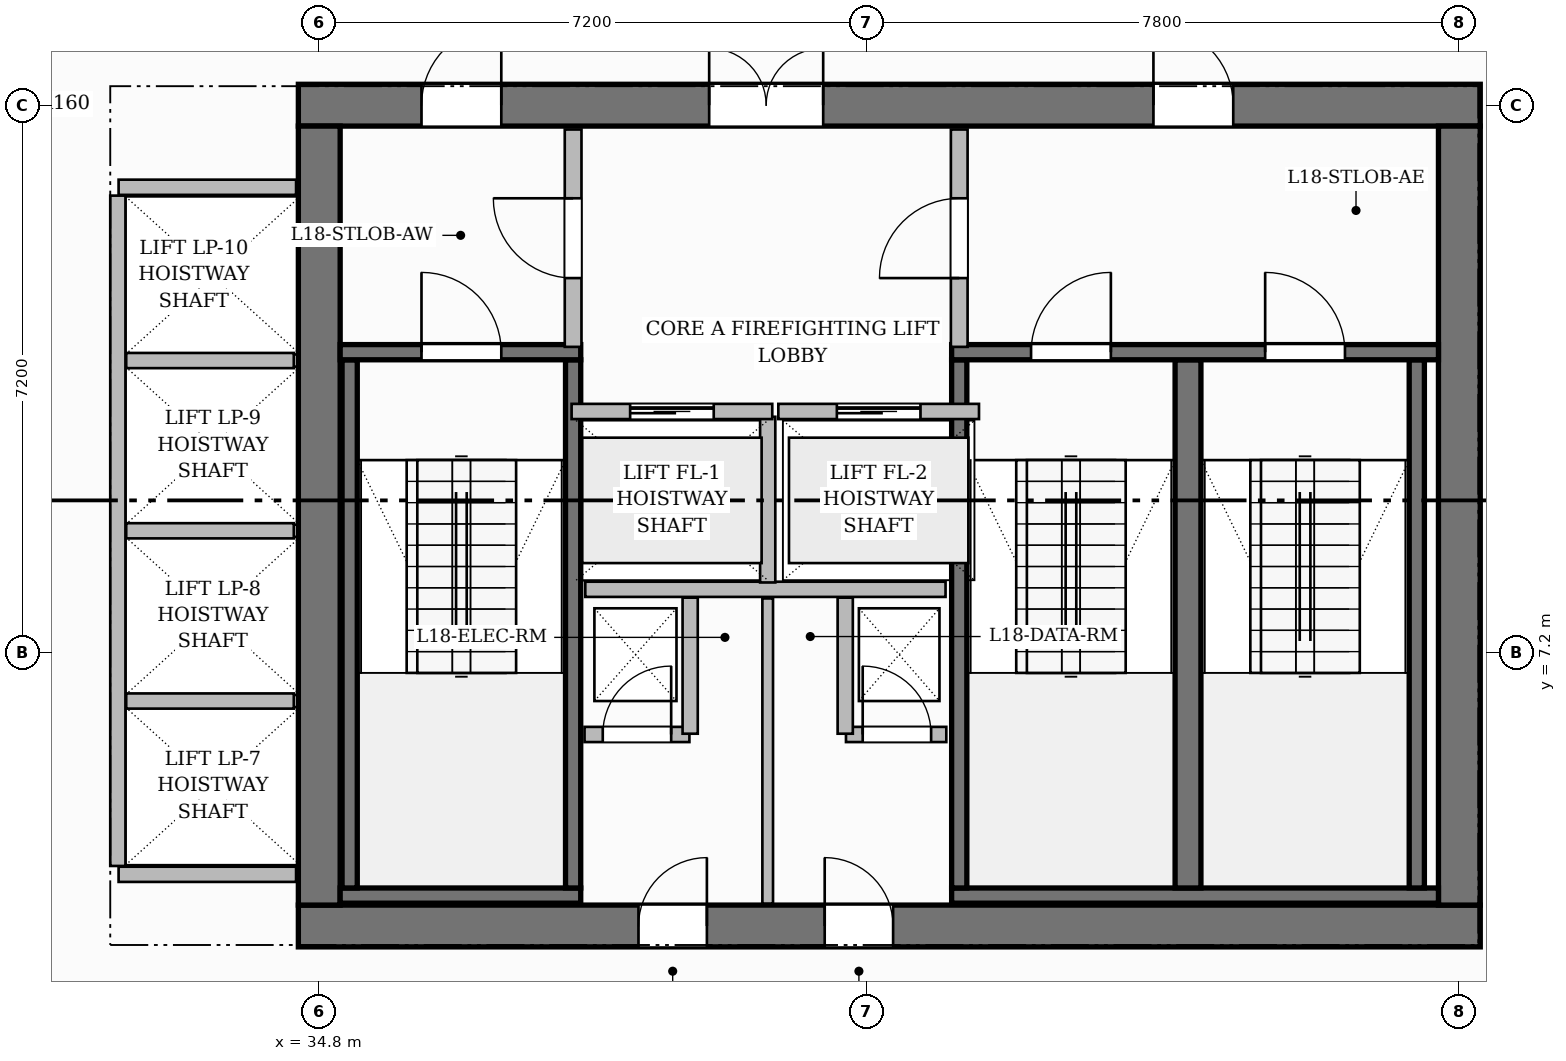
"""IFC4 building model, lengths in metres.
Left out: names, types, materials, properties, quantities, classifications, styles, units other than length and angle.
Written with IfcOpenShell. Run it as: python <this file> out.ifc"""

import sys

from ifc_helpers import new_model, si_unit, direction, frame, frame_2d, origin, place, context, subcontext, project, spatial, rectangle, extrude, source, transform, mapped, element, fill, save


model = new_model("IFC4")
c1 = context("Model", 3, precision=1e-05, world=origin(), true_north=direction((0.0, 1.0)))
c2 = subcontext(c1, "Body", "Model", "MODEL_VIEW")
j1 = project(units=[si_unit("LENGTHUNIT", "METRE"), si_unit("PLANEANGLEUNIT", "RADIAN")], contexts=[c1])
p1 = place(None, origin())
s1 = spatial("IfcSite", under=j1, at=p1, CompositionType="ELEMENT")
p2 = place(p1, origin())
s2 = spatial("IfcBuilding", under=s1, at=p2, CompositionType="ELEMENT")
p3 = place(p2, frame((0.0, 0.0, 76.8)))
s3 = spatial("IfcBuildingStorey", under=s2, at=p3, CompositionType="ELEMENT", Elevation=76.8)
p4 = place(p3, frame((34.525, 3.6, 0.0), z_axis=(0.0, 0.0, 1.0), x_axis=(1.0, 0.0, 0.0)))
e1 = element("IfcWall", 1, at=p4, inside=s3, PredefinedType="SHEAR", context=c2, shape_type="SweptSolid", body=[
    extrude(rectangle(XDim=15.55, YDim=0.55, at=frame_2d((7.775, 0.0))), origin(), (0.0, 0.0, 1.0), 3.7),
])
p5 = place(p4, frame((4.475, 0.0, 0.0)))
e2 = element("IfcOpeningElement", 2, at=p5, cuts=e1, PredefinedType="OPENING", context=c2, shape_type="SweptSolid", body=[
    extrude(rectangle(XDim=0.9, YDim=2.1, at=frame_2d((0.45, 1.05))), frame((0.0, 0.285, 0.0), z_axis=(0.0, -1.0, 0.0), x_axis=(1.0, 0.0, 0.0)), (0.0, 0.0, 1.0), 0.57),
])
p6 = place(p4, frame((6.925, 0.0, 0.0)))
e3 = element("IfcOpeningElement", 3, at=p6, cuts=e1, PredefinedType="OPENING", context=c2, shape_type="SweptSolid", body=[
    extrude(rectangle(XDim=0.9, YDim=2.1, at=frame_2d((0.45, 1.05))), frame((0.0, 0.285, 0.0), z_axis=(0.0, -1.0, 0.0), x_axis=(1.0, 0.0, 0.0)), (0.0, 0.0, 1.0), 0.57),
])
p7 = place(p3, frame((34.525, 14.4, 0.0), z_axis=(0.0, 0.0, 1.0), x_axis=(1.0, 0.0, 0.0)))
e4 = element("IfcWall", 4, at=p7, inside=s3, PredefinedType="SHEAR", context=c2, shape_type="SweptSolid", body=[
    extrude(rectangle(XDim=15.55, YDim=0.55, at=frame_2d((7.775, 0.0))), origin(), (0.0, 0.0, 1.0), 3.7),
])
p8 = place(p7, frame((5.405, 0.0, 0.0)))
e5 = element("IfcOpeningElement", 5, at=p8, cuts=e4, PredefinedType="OPENING", context=c2, shape_type="SweptSolid", body=[
    extrude(rectangle(XDim=1.5, YDim=2.2, at=frame_2d((0.75, 1.1))), frame((0.0, 0.285, 0.0), z_axis=(0.0, -1.0, 0.0), x_axis=(1.0, 0.0, 0.0)), (0.0, 0.0, 1.0), 0.57),
])
p9 = place(p7, frame((1.62, 0.0, 0.0)))
e6 = element("IfcOpeningElement", 6, at=p9, cuts=e4, PredefinedType="OPENING", context=c2, shape_type="SweptSolid", body=[
    extrude(rectangle(XDim=1.05, YDim=2.15, at=frame_2d((0.525, 1.075))), frame((0.0, 0.285, 0.0), z_axis=(0.0, -1.0, 0.0), x_axis=(1.0, 0.0, 0.0)), (0.0, 0.0, 1.0), 0.57),
])
p10 = place(p7, frame((11.25, 0.0, 0.0)))
e7 = element("IfcOpeningElement", 7, at=p10, cuts=e4, PredefinedType="OPENING", context=c2, shape_type="SweptSolid", body=[
    extrude(rectangle(XDim=1.05, YDim=2.15, at=frame_2d((0.525, 1.075))), frame((0.0, 0.285, 0.0), z_axis=(0.0, -1.0, 0.0), x_axis=(1.0, 0.0, 0.0)), (0.0, 0.0, 1.0), 0.57),
])
for number, where, z_axis, x_axis in (
    (8, (34.8, 3.875, 0.0), (0.0, 0.0, 1.0), (0.0, 1.0, 0.0)),
    (9, (49.8, 3.875, 0.0), (0.0, 0.0, 1.0), (0.0, 1.0, 0.0)),
):
    element("IfcWall", number, at=place(p3, frame(where, z_axis=z_axis, x_axis=x_axis)), inside=s3, PredefinedType="SHEAR", context=c2, shape_type="SweptSolid", body=[
        extrude(rectangle(XDim=10.25, YDim=0.55, at=frame_2d((5.125, 0.0))), origin(), (0.0, 0.0, 1.0), 3.7),
    ])
p11 = place(p3, frame((35.075, 4.0, 0.0), z_axis=(0.0, 0.0, 1.0), x_axis=(1.0, 0.0, 0.0)))
e10 = element("IfcWall", 10, at=p11, inside=s3, PredefinedType="SHEAR", context=c2, shape_type="SweptSolid", body=[
    extrude(rectangle(XDim=3.165, YDim=0.2, at=frame_2d((1.583, 0.0))), origin(), (0.0, 0.0, 1.0), 3.7),
])
for number, where, z_axis, x_axis in (
    (11, (35.2, 4.1, 0.0), (0.0, 0.0, 1.0), (0.0, 1.0, 0.0)),
    (12, (38.14, 4.1, 0.0), (0.0, 0.0, 1.0), (0.0, 1.0, 0.0)),
):
    element("IfcWall", number, at=place(p3, frame(where, z_axis=z_axis, x_axis=x_axis)), inside=s3, PredefinedType="SHEAR", context=c2, shape_type="SweptSolid", body=[
        extrude(rectangle(XDim=6.95, YDim=0.2, at=frame_2d((3.475, 0.0))), origin(), (0.0, 0.0, 1.0), 3.7),
    ])
p12 = place(p3, frame((35.075, 11.15, 0.0), z_axis=(0.0, 0.0, 1.0), x_axis=(1.0, 0.0, 0.0)))
e13 = element("IfcWall", 13, at=p12, inside=s3, PredefinedType="SHEAR", context=c2, shape_type="SweptSolid", body=[
    extrude(rectangle(XDim=3.165, YDim=0.2, at=frame_2d((1.583, 0.0))), origin(), (0.0, 0.0, 1.0), 3.7),
])
p13 = place(p12, frame((1.07, 0.0, 0.0)))
e14 = element("IfcOpeningElement", 14, at=p13, cuts=e13, PredefinedType="OPENING", context=c2, shape_type="SweptSolid", body=[
    extrude(rectangle(XDim=1.05, YDim=2.2, at=frame_2d((0.525, 1.1))), frame((0.0, 0.11, 0.0), z_axis=(0.0, -1.0, 0.0), x_axis=(1.0, 0.0, 0.0)), (0.0, 0.0, 1.0), 0.22),
])
p14 = place(p3, frame((43.12, 4.0, 0.0), z_axis=(0.0, 0.0, 1.0), x_axis=(1.0, 0.0, 0.0)))
e15 = element("IfcWall", 15, at=p14, inside=s3, PredefinedType="SHEAR", context=c2, shape_type="SweptSolid", body=[
    extrude(rectangle(XDim=6.405, YDim=0.2, at=frame_2d((3.202, 0.0))), origin(), (0.0, 0.0, 1.0), 3.7),
])
p15 = place(p3, frame((43.22, 4.1, 0.0), z_axis=(0.0, 0.0, 1.0), x_axis=(0.0, 1.0, 0.0)))
e16 = element("IfcWall", 16, at=p15, inside=s3, PredefinedType="SHEAR", context=c2, shape_type="SweptSolid", body=[
    extrude(rectangle(XDim=6.95, YDim=0.2, at=frame_2d((3.475, 0.0))), origin(), (0.0, 0.0, 1.0), 3.7),
])
p16 = place(p3, frame((46.23, 4.1, 0.0), z_axis=(0.0, 0.0, 1.0), x_axis=(0.0, 1.0, 0.0)))
e17 = element("IfcWall", 17, at=p16, inside=s3, PredefinedType="SHEAR", context=c2, shape_type="SweptSolid", body=[
    extrude(rectangle(XDim=6.95, YDim=0.34, at=frame_2d((3.475, 0.0))), origin(), (0.0, 0.0, 1.0), 3.7),
])
p17 = place(p3, frame((49.24, 4.1, 0.0), z_axis=(0.0, 0.0, 1.0), x_axis=(0.0, 1.0, 0.0)))
e18 = element("IfcWall", 18, at=p17, inside=s3, PredefinedType="SHEAR", context=c2, shape_type="SweptSolid", body=[
    extrude(rectangle(XDim=6.95, YDim=0.2, at=frame_2d((3.475, 0.0))), origin(), (0.0, 0.0, 1.0), 3.7),
])
p18 = place(p3, frame((43.12, 11.15, 0.0), z_axis=(0.0, 0.0, 1.0), x_axis=(1.0, 0.0, 0.0)))
e19 = element("IfcWall", 19, at=p18, inside=s3, PredefinedType="SHEAR", context=c2, shape_type="SweptSolid", body=[
    extrude(rectangle(XDim=6.405, YDim=0.2, at=frame_2d((3.202, 0.0))), origin(), (0.0, 0.0, 1.0), 3.7),
])
p19 = place(p18, frame((1.045, 0.0, 0.0)))
e20 = element("IfcOpeningElement", 20, at=p19, cuts=e19, PredefinedType="OPENING", context=c2, shape_type="SweptSolid", body=[
    extrude(rectangle(XDim=1.05, YDim=2.2, at=frame_2d((0.525, 1.1))), frame((0.0, 0.11, 0.0), z_axis=(0.0, -1.0, 0.0), x_axis=(1.0, 0.0, 0.0)), (0.0, 0.0, 1.0), 0.22),
])
p20 = place(p18, frame((4.125, 0.0, 0.0)))
e21 = element("IfcOpeningElement", 21, at=p20, cuts=e19, PredefinedType="OPENING", context=c2, shape_type="SweptSolid", body=[
    extrude(rectangle(XDim=1.05, YDim=2.2, at=frame_2d((0.525, 1.1))), frame((0.0, 0.11, 0.0), z_axis=(0.0, -1.0, 0.0), x_axis=(1.0, 0.0, 0.0)), (0.0, 0.0, 1.0), 0.22),
])
p21 = place(p3, frame((38.3, 8.03, 0.0), z_axis=(0.0, 0.0, 1.0), x_axis=(1.0, 0.0, 0.0)))
e22 = element("IfcWall", 22, at=p21, inside=s3, PredefinedType="PARTITIONING", context=c2, shape_type="SweptSolid", body=[
    extrude(rectangle(XDim=4.74, YDim=0.2, at=frame_2d((2.37, 0.0))), origin(), (0.0, 0.0, 1.0), 3.45),
])
p22 = place(p3, frame((40.7, 8.12, 0.0), z_axis=(0.0, 0.0, 1.0), x_axis=(0.0, 1.0, 0.0)))
e23 = element("IfcWall", 23, at=p22, inside=s3, PredefinedType="PARTITIONING", context=c2, shape_type="SweptSolid", body=[
    extrude(rectangle(XDim=2.18, YDim=0.2, at=frame_2d((1.09, 0.0))), origin(), (0.0, 0.0, 1.0), 3.45),
])
p23 = place(p3, frame((38.14, 11.22, 0.0), z_axis=(0.0, 0.0, 1.0), x_axis=(0.0, 1.0, 0.0)))
e24 = element("IfcWall", 24, at=p23, inside=s3, PredefinedType="PARTITIONING", context=c2, shape_type="SweptSolid", body=[
    extrude(rectangle(XDim=2.86, YDim=0.22, at=frame_2d((1.43, 0.0))), origin(), (0.0, 0.0, 1.0), 3.45),
])
p24 = place(p23, frame((0.905, 0.0, 0.0)))
e25 = element("IfcOpeningElement", 25, at=p24, cuts=e24, PredefinedType="OPENING", context=c2, shape_type="SweptSolid", body=[
    extrude(rectangle(XDim=1.05, YDim=2.15, at=frame_2d((0.525, 1.075))), frame((0.0, 0.12, 0.0), z_axis=(0.0, -1.0, 0.0), x_axis=(1.0, 0.0, 0.0)), (0.0, 0.0, 1.0), 0.24),
])
p25 = place(p3, frame((43.22, 11.22, 0.0), z_axis=(0.0, 0.0, 1.0), x_axis=(0.0, 1.0, 0.0)))
e26 = element("IfcWall", 26, at=p25, inside=s3, PredefinedType="PARTITIONING", context=c2, shape_type="SweptSolid", body=[
    extrude(rectangle(XDim=2.86, YDim=0.22, at=frame_2d((1.43, 0.0))), origin(), (0.0, 0.0, 1.0), 3.45),
])
p26 = place(p25, frame((0.905, 0.0, 0.0)))
e27 = element("IfcOpeningElement", 27, at=p26, cuts=e26, PredefinedType="OPENING", context=c2, shape_type="SweptSolid", body=[
    extrude(rectangle(XDim=1.05, YDim=2.15, at=frame_2d((0.525, 1.075))), frame((0.0, 0.12, 0.0), z_axis=(0.0, -1.0, 0.0), x_axis=(1.0, 0.0, 0.0)), (0.0, 0.0, 1.0), 0.24),
])
p27 = place(p3, frame((38.29, 6.12, 0.0), z_axis=(0.0, 0.0, 1.0), x_axis=(1.0, 0.0, 0.0)))
e28 = element("IfcWall", 28, at=p27, inside=s3, PredefinedType="PARTITIONING", context=c2, shape_type="SweptSolid", body=[
    extrude(rectangle(XDim=1.38, YDim=0.2, at=frame_2d((0.69, 0.0))), origin(), (0.0, 0.0, 1.0), 3.45),
])
p28 = place(p27, frame((0.24, 0.0, 0.0)))
e29 = element("IfcOpeningElement", 29, at=p28, cuts=e28, PredefinedType="OPENING", context=c2, shape_type="SweptSolid", body=[
    extrude(rectangle(XDim=0.9, YDim=2.1, at=frame_2d((0.45, 1.05))), frame((0.0, 0.11, 0.0), z_axis=(0.0, -1.0, 0.0), x_axis=(1.0, 0.0, 0.0)), (0.0, 0.0, 1.0), 0.22),
])
p29 = place(p3, frame((39.68, 6.13, 0.0), z_axis=(0.0, 0.0, 1.0), x_axis=(0.0, 1.0, 0.0)))
e30 = element("IfcWall", 30, at=p29, inside=s3, PredefinedType="PARTITIONING", context=c2, shape_type="SweptSolid", body=[
    extrude(rectangle(XDim=1.79, YDim=0.2, at=frame_2d((0.895, 0.0))), origin(), (0.0, 0.0, 1.0), 3.45),
])
p30 = place(p3, frame((41.73, 6.12, 0.0), z_axis=(0.0, 0.0, 1.0), x_axis=(1.0, 0.0, 0.0)))
e31 = element("IfcWall", 31, at=p30, inside=s3, PredefinedType="PARTITIONING", context=c2, shape_type="SweptSolid", body=[
    extrude(rectangle(XDim=1.32, YDim=0.2, at=frame_2d((0.66, 0.0))), origin(), (0.0, 0.0, 1.0), 3.45),
])
p31 = place(p30, frame((0.22, 0.0, 0.0)))
e32 = element("IfcOpeningElement", 32, at=p31, cuts=e31, PredefinedType="OPENING", context=c2, shape_type="SweptSolid", body=[
    extrude(rectangle(XDim=0.9, YDim=2.1, at=frame_2d((0.45, 1.05))), frame((0.0, 0.11, 0.0), z_axis=(0.0, -1.0, 0.0), x_axis=(1.0, 0.0, 0.0)), (0.0, 0.0, 1.0), 0.22),
])
p32 = place(p3, frame((41.72, 6.13, 0.0), z_axis=(0.0, 0.0, 1.0), x_axis=(0.0, 1.0, 0.0)))
e33 = element("IfcWall", 33, at=p32, inside=s3, PredefinedType="PARTITIONING", context=c2, shape_type="SweptSolid", body=[
    extrude(rectangle(XDim=1.79, YDim=0.2, at=frame_2d((0.895, 0.0))), origin(), (0.0, 0.0, 1.0), 3.45),
])
p33 = place(p3, frame((40.7, 3.895, 0.0), z_axis=(0.0, 0.0, 1.0), x_axis=(0.0, 1.0, 0.0)))
e34 = element("IfcWall", 34, at=p33, inside=s3, PredefinedType="PARTITIONING", context=c2, shape_type="SweptSolid", body=[
    extrude(rectangle(XDim=4.015, YDim=0.14, at=frame_2d((2.007, 0.0))), origin(), (0.0, 0.0, 1.0), 3.45),
])
for number, where, z_axis, x_axis in (
    (35, (32.16, 4.28, 0.0), (0.0, 0.0, 1.0), (1.0, 0.0, 0.0)),
    (36, (32.16, 13.32, 0.0), (0.0, 0.0, 1.0), (1.0, 0.0, 0.0)),
):
    element("IfcWall", number, at=place(p3, frame(where, z_axis=z_axis, x_axis=x_axis)), inside=s3, PredefinedType="PARTITIONING", context=c2, shape_type="SweptSolid", body=[
        extrude(rectangle(XDim=2.335, YDim=0.2, at=frame_2d((1.167, 0.0))), origin(), (0.0, 0.0, 1.0), 3.45),
    ])
p34 = place(p3, frame((32.15, 4.39, 0.0), z_axis=(0.0, 0.0, 1.0), x_axis=(0.0, 1.0, 0.0)))
e37 = element("IfcWall", 37, at=p34, inside=s3, PredefinedType="PARTITIONING", context=c2, shape_type="SweptSolid", body=[
    extrude(rectangle(XDim=8.82, YDim=0.2, at=frame_2d((4.41, 0.0))), origin(), (0.0, 0.0, 1.0), 3.45),
])
for number, where, z_axis, x_axis in (
    (38, (32.26, 6.56, 0.0), (0.0, 0.0, 1.0), (1.0, 0.0, 0.0)),
    (39, (32.26, 8.8, 0.0), (0.0, 0.0, 1.0), (1.0, 0.0, 0.0)),
    (40, (32.26, 11.04, 0.0), (0.0, 0.0, 1.0), (1.0, 0.0, 0.0)),
):
    element("IfcWall", number, at=place(p3, frame(where, z_axis=z_axis, x_axis=x_axis)), inside=s3, PredefinedType="PARTITIONING", context=c2, shape_type="SweptSolid", body=[
        extrude(rectangle(XDim=2.205, YDim=0.2, at=frame_2d((1.103, 0.0))), origin(), (0.0, 0.0, 1.0), 3.45),
    ])
p35 = place(p3, frame((38.12, 10.37, 0.0), z_axis=(0.0, 0.0, 1.0), x_axis=(1.0, 0.0, 0.0)))
e41 = element("IfcWall", 41, at=p35, inside=s3, PredefinedType="PARTITIONING", context=c2, shape_type="SweptSolid", body=[
    extrude(rectangle(XDim=2.64, YDim=0.2, at=frame_2d((1.32, 0.0))), origin(), (0.0, 0.0, 1.0), 3.45),
])
p36 = place(p35, frame((0.77, 0.0, 0.0)))
e42 = element("IfcOpeningElement", 42, at=p36, cuts=e41, PredefinedType="OPENING", context=c2, shape_type="SweptSolid", body=[
    extrude(rectangle(XDim=1.1, YDim=2.2, at=frame_2d((0.55, 1.1))), frame((0.0, 0.11, 0.0), z_axis=(0.0, -1.0, 0.0), x_axis=(1.0, 0.0, 0.0)), (0.0, 0.0, 1.0), 0.22),
])
p37 = place(p3, frame((40.84, 10.37, 0.0), z_axis=(0.0, 0.0, 1.0), x_axis=(1.0, 0.0, 0.0)))
e43 = element("IfcWall", 43, at=p37, inside=s3, PredefinedType="PARTITIONING", context=c2, shape_type="SweptSolid", body=[
    extrude(rectangle(XDim=2.64, YDim=0.2, at=frame_2d((1.32, 0.0))), origin(), (0.0, 0.0, 1.0), 3.45),
])
p38 = place(p37, frame((0.77, 0.0, 0.0)))
e44 = element("IfcOpeningElement", 44, at=p38, cuts=e43, PredefinedType="OPENING", context=c2, shape_type="SweptSolid", body=[
    extrude(rectangle(XDim=1.1, YDim=2.2, at=frame_2d((0.55, 1.1))), frame((0.0, 0.11, 0.0), z_axis=(0.0, -1.0, 0.0), x_axis=(1.0, 0.0, 0.0)), (0.0, 0.0, 1.0), 0.22),
])
m1 = source(origin(), c2, "Body", "SweptSolid", [
    extrude(rectangle(XDim=1.05, YDim=2.2, at=frame_2d((0.525, 1.1))), frame((0.0, 0.025, 0.0), z_axis=(0.0, -1.0, 0.0), x_axis=(1.0, 0.0, 0.0)), (0.0, 0.0, 1.0), 0.05),
])
p39 = place(p13, origin())
e45 = element("IfcDoor", 45, at=p39, inside=s3, OperationType="SINGLE_SWING_LEFT", PredefinedType="DOOR", context=c2, shape_type="MappedRepresentation", body=[
    mapped(m1, transform((0.0, 0.0, 0.0), scale=1.0)),
])
fill(e14, e45)
p40 = place(p19, origin())
e46 = element("IfcDoor", 46, at=p40, inside=s3, OperationType="SINGLE_SWING_RIGHT", PredefinedType="DOOR", context=c2, shape_type="MappedRepresentation", body=[
    mapped(m1, transform((0.0, 0.0, 0.0), scale=1.0)),
])
fill(e20, e46)
p41 = place(p20, origin())
e47 = element("IfcDoor", 47, at=p41, inside=s3, OperationType="SINGLE_SWING_LEFT", PredefinedType="DOOR", context=c2, shape_type="MappedRepresentation", body=[
    mapped(m1, transform((0.0, 0.0, 0.0), scale=1.0)),
])
fill(e21, e47)
m2 = source(origin(), c2, "Body", "SweptSolid", [
    extrude(rectangle(XDim=1.05, YDim=2.15, at=frame_2d((0.525, 1.075))), frame((0.0, 0.025, 0.0), z_axis=(0.0, -1.0, 0.0), x_axis=(1.0, 0.0, 0.0)), (0.0, 0.0, 1.0), 0.05),
])
p42 = place(p24, origin())
e48 = element("IfcDoor", 48, at=p42, inside=s3, OperationType="SINGLE_SWING_RIGHT", PredefinedType="DOOR", context=c2, shape_type="MappedRepresentation", body=[
    mapped(m2, transform((0.0, 0.0, 0.0), scale=1.0)),
])
fill(e25, e48)
p43 = place(p26, origin())
e49 = element("IfcDoor", 49, at=p43, inside=s3, OperationType="SINGLE_SWING_LEFT", PredefinedType="DOOR", context=c2, shape_type="MappedRepresentation", body=[
    mapped(m2, transform((0.0, 0.0, 0.0), scale=1.0)),
])
fill(e27, e49)
m3 = source(origin(), c2, "Body", "SweptSolid", [
    extrude(rectangle(XDim=1.5, YDim=2.2, at=frame_2d((0.75, 1.1))), frame((0.0, 0.025, 0.0), z_axis=(0.0, -1.0, 0.0), x_axis=(1.0, 0.0, 0.0)), (0.0, 0.0, 1.0), 0.05),
])
p44 = place(p8, origin())
e50 = element("IfcDoor", 50, at=p44, inside=s3, OperationType="DOUBLE_DOOR_SINGLE_SWING", PredefinedType="DOOR", context=c2, shape_type="MappedRepresentation", body=[
    mapped(m3, transform((0.0, 0.0, 0.0), scale=1.0)),
])
fill(e5, e50)
p45 = place(p9, origin())
e51 = element("IfcDoor", 51, at=p45, inside=s3, OperationType="SINGLE_SWING_RIGHT", PredefinedType="DOOR", context=c2, shape_type="MappedRepresentation", body=[
    mapped(m2, transform((0.0, 0.0, 0.0), scale=1.0)),
])
fill(e6, e51)
p46 = place(p10, origin())
e52 = element("IfcDoor", 52, at=p46, inside=s3, OperationType="SINGLE_SWING_LEFT", PredefinedType="DOOR", context=c2, shape_type="MappedRepresentation", body=[
    mapped(m2, transform((0.0, 0.0, 0.0), scale=1.0)),
])
fill(e7, e52)
m4 = source(origin(), c2, "Body", "SweptSolid", [
    extrude(rectangle(XDim=0.9, YDim=2.1, at=frame_2d((0.45, 1.05))), frame((0.0, 0.025, 0.0), z_axis=(0.0, -1.0, 0.0), x_axis=(1.0, 0.0, 0.0)), (0.0, 0.0, 1.0), 0.05),
])
p47 = place(p28, origin())
e53 = element("IfcDoor", 53, at=p47, inside=s3, OperationType="SINGLE_SWING_RIGHT", PredefinedType="DOOR", context=c2, shape_type="MappedRepresentation", body=[
    mapped(m4, transform((0.0, 0.0, 0.0), scale=1.0)),
])
fill(e29, e53)
p48 = place(p31, origin())
e54 = element("IfcDoor", 54, at=p48, inside=s3, OperationType="SINGLE_SWING_LEFT", PredefinedType="DOOR", context=c2, shape_type="MappedRepresentation", body=[
    mapped(m4, transform((0.0, 0.0, 0.0), scale=1.0)),
])
fill(e32, e54)
p49 = place(p5, origin())
e55 = element("IfcDoor", 55, at=p49, inside=s3, OperationType="SINGLE_SWING_RIGHT", PredefinedType="DOOR", context=c2, shape_type="MappedRepresentation", body=[
    mapped(m4, transform((0.0, 0.0, 0.0), scale=1.0)),
])
fill(e2, e55)
p50 = place(p6, origin())
e56 = element("IfcDoor", 56, at=p50, inside=s3, OperationType="SINGLE_SWING_LEFT", PredefinedType="DOOR", context=c2, shape_type="MappedRepresentation", body=[
    mapped(m4, transform((0.0, 0.0, 0.0), scale=1.0)),
])
fill(e3, e56)
m5 = source(origin(), c2, "Body", "SweptSolid", [
    extrude(rectangle(XDim=1.1, YDim=2.2, at=frame_2d((0.55, 1.1))), frame((0.0, 0.025, 0.0), z_axis=(0.0, -1.0, 0.0), x_axis=(1.0, 0.0, 0.0)), (0.0, 0.0, 1.0), 0.05),
])
p51 = place(p36, origin())
e57 = element("IfcDoor", 57, at=p51, inside=s3, OperationType="SLIDING_TO_LEFT", PredefinedType="DOOR", context=c2, shape_type="MappedRepresentation", body=[
    mapped(m5, transform((0.0, 0.0, 0.0), scale=1.0)),
])
fill(e42, e57)
p52 = place(p38, origin())
e58 = element("IfcDoor", 58, at=p52, inside=s3, OperationType="SLIDING_TO_LEFT", PredefinedType="DOOR", context=c2, shape_type="MappedRepresentation", body=[
    mapped(m5, transform((0.0, 0.0, 0.0), scale=1.0)),
])
fill(e44, e58)
save(model, sys.argv[1])
